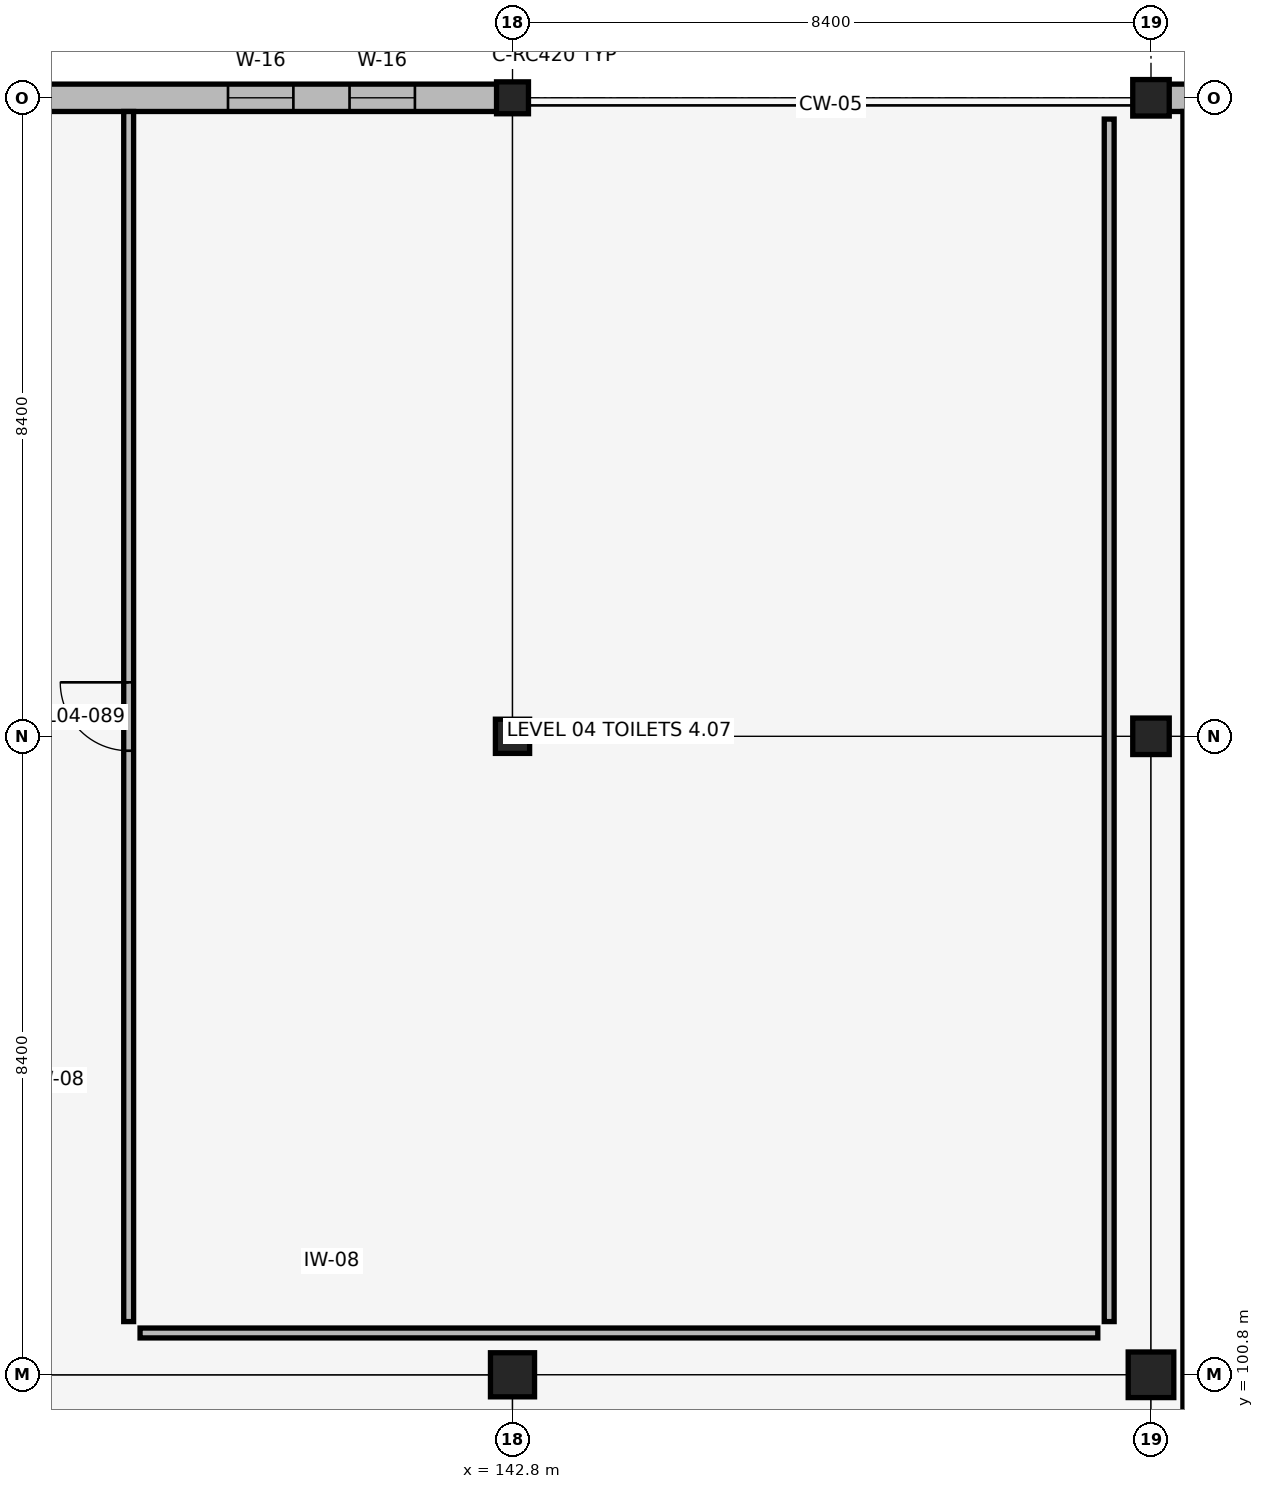
"""IFC4 building model, lengths in metres.
Left out: names, types, materials, properties, quantities, classifications, styles, units other than length and angle.
Written with IfcOpenShell. Run it as: python <this file> out.ifc"""

import sys

from ifc_helpers import new_model, si_unit, direction, frame, frame_2d, origin, origin_2d, place, context, subcontext, project, spatial, rectangle, extrude, element, fill, save


model = new_model("IFC4")
c1 = context("Model", 3, precision=1e-05, world=origin(), true_north=direction((0.0, 1.0)))
c2 = subcontext(c1, "Body", "Model", "MODEL_VIEW")
j1 = project(units=[si_unit("LENGTHUNIT", "METRE"), si_unit("PLANEANGLEUNIT", "RADIAN")], contexts=[c1])
p1 = place(None, origin())
s1 = spatial("IfcSite", under=j1, at=p1, CompositionType="ELEMENT")
p2 = place(p1, origin())
s2 = spatial("IfcBuilding", under=s1, at=p2, CompositionType="ELEMENT")
p3 = place(p2, frame((0.0, 0.0, 18.02)))
s3 = spatial("IfcBuildingStorey", under=s2, at=p3, CompositionType="ELEMENT", Elevation=18.02)
p4 = place(p3, frame((142.8, 100.8, 0.0), z_axis=(0.0, 0.0, 1.0), x_axis=(1.0, 0.0, 0.0)))
e1 = element("IfcColumn", 1, at=p4, inside=s3, PredefinedType="COLUMN", context=c2, shape_type="SweptSolid", body=[
    extrude(rectangle(XDim=0.58, YDim=0.58, at=origin_2d()), origin(), (0.0, 0.0, 1.0), 3.78),
])
p5 = place(p3, frame((142.8, 109.2, 0.0), z_axis=(0.0, 0.0, 1.0), x_axis=(1.0, 0.0, 0.0)))
e2 = element("IfcColumn", 2, at=p5, inside=s3, PredefinedType="COLUMN", context=c2, shape_type="SweptSolid", body=[
    extrude(rectangle(XDim=0.45, YDim=0.45, at=origin_2d()), origin(), (0.0, 0.0, 1.0), 3.78),
])
p6 = place(p3, frame((142.8, 117.6, 0.0), z_axis=(0.0, 0.0, 1.0), x_axis=(1.0, 0.0, 0.0)))
e3 = element("IfcColumn", 3, at=p6, inside=s3, PredefinedType="COLUMN", context=c2, shape_type="SweptSolid", body=[
    extrude(rectangle(XDim=0.42, YDim=0.42, at=origin_2d()), origin(), (0.0, 0.0, 1.0), 3.78),
])
p7 = place(p3, frame((151.2, 100.8, 0.0), z_axis=(0.0, 0.0, 1.0), x_axis=(1.0, 0.0, 0.0)))
e4 = element("IfcColumn", 4, at=p7, inside=s3, PredefinedType="COLUMN", context=c2, shape_type="SweptSolid", body=[
    extrude(rectangle(XDim=0.6, YDim=0.6, at=origin_2d()), origin(), (0.0, 0.0, 1.0), 3.78),
])
for number, where, z_axis, x_axis in (
    (5, (151.2, 109.2, 0.0), (0.0, 0.0, 1.0), (1.0, 0.0, 0.0)),
    (6, (151.2, 117.6, 0.0), (0.0, 0.0, 1.0), (1.0, 0.0, 0.0)),
):
    element("IfcColumn", number, at=place(p3, frame(where, z_axis=z_axis, x_axis=x_axis)), inside=s3, PredefinedType="COLUMN", context=c2, shape_type="SweptSolid", body=[
        extrude(rectangle(XDim=0.48, YDim=0.48, at=origin_2d()), origin(), (0.0, 0.0, 1.0), 3.78),
    ])
p8 = place(p3, frame((134.61, 117.6, 0.0), z_axis=(0.0, 0.0, 1.0), x_axis=(1.0, 0.0, 0.0)))
e7 = element("IfcWall", 7, at=p8, inside=s3, PredefinedType="SOLIDWALL", context=c2, shape_type="SweptSolid", body=[
    extrude(rectangle(XDim=7.995, YDim=0.36, at=frame_2d((3.998, 0.0))), origin(), (0.0, 0.0, 1.0), 3.78),
])
p9 = place(p8, frame((1.089, 0.0, 0.75)))
e8 = element("IfcOpeningElement", 8, at=p9, cuts=e7, PredefinedType="OPENING", context=c2, shape_type="SweptSolid", body=[
    extrude(rectangle(XDim=0.86, YDim=2.6, at=frame_2d((0.43, 1.3))), frame((0.0, 0.19, 0.0), z_axis=(0.0, -1.0, 0.0), x_axis=(1.0, 0.0, 0.0)), (0.0, 0.0, 1.0), 0.38),
])
p10 = place(p8, frame((4.447, 0.0, 0.75)))
e9 = element("IfcOpeningElement", 9, at=p10, cuts=e7, PredefinedType="OPENING", context=c2, shape_type="SweptSolid", body=[
    extrude(rectangle(XDim=0.86, YDim=2.6, at=frame_2d((0.43, 1.3))), frame((0.0, 0.19, 0.0), z_axis=(0.0, -1.0, 0.0), x_axis=(1.0, 0.0, 0.0)), (0.0, 0.0, 1.0), 0.38),
])
p11 = place(p8, frame((6.046, 0.0, 0.75)))
e10 = element("IfcOpeningElement", 10, at=p11, cuts=e7, PredefinedType="OPENING", context=c2, shape_type="SweptSolid", body=[
    extrude(rectangle(XDim=0.86, YDim=2.6, at=frame_2d((0.43, 1.3))), frame((0.0, 0.19, 0.0), z_axis=(0.0, -1.0, 0.0), x_axis=(1.0, 0.0, 0.0)), (0.0, 0.0, 1.0), 0.38),
])
p12 = place(p3, frame((151.425, 117.6, 0.0), z_axis=(0.0, 0.0, 1.0), x_axis=(1.0, 0.0, 0.0)))
e11 = element("IfcWall", 11, at=p12, inside=s3, PredefinedType="SOLIDWALL", context=c2, shape_type="SweptSolid", body=[
    extrude(rectangle(XDim=7.98, YDim=0.36, at=frame_2d((3.99, 0.0))), origin(), (0.0, 0.0, 1.0), 3.78),
])
p13 = place(p12, frame((1.056, 0.0, 0.75)))
e12 = element("IfcOpeningElement", 12, at=p13, cuts=e11, PredefinedType="OPENING", context=c2, shape_type="SweptSolid", body=[
    extrude(rectangle(XDim=0.92, YDim=2.5, at=frame_2d((0.46, 1.25))), frame((0.0, 0.19, 0.0), z_axis=(0.0, -1.0, 0.0), x_axis=(1.0, 0.0, 0.0)), (0.0, 0.0, 1.0), 0.38),
])
p14 = place(p12, frame((2.652, 0.0, 0.75)))
e13 = element("IfcOpeningElement", 13, at=p14, cuts=e11, PredefinedType="OPENING", context=c2, shape_type="SweptSolid", body=[
    extrude(rectangle(XDim=0.92, YDim=2.5, at=frame_2d((0.46, 1.25))), frame((0.0, 0.19, 0.0), z_axis=(0.0, -1.0, 0.0), x_axis=(1.0, 0.0, 0.0)), (0.0, 0.0, 1.0), 0.38),
])
p15 = place(p12, frame((4.408, 0.0, 0.75)))
e14 = element("IfcOpeningElement", 14, at=p15, cuts=e11, PredefinedType="OPENING", context=c2, shape_type="SweptSolid", body=[
    extrude(rectangle(XDim=0.92, YDim=2.5, at=frame_2d((0.46, 1.25))), frame((0.0, 0.19, 0.0), z_axis=(0.0, -1.0, 0.0), x_axis=(1.0, 0.0, 0.0)), (0.0, 0.0, 1.0), 0.38),
])
p16 = place(p12, frame((6.004, 0.0, 0.75)))
e15 = element("IfcOpeningElement", 15, at=p16, cuts=e11, PredefinedType="OPENING", context=c2, shape_type="SweptSolid", body=[
    extrude(rectangle(XDim=0.92, YDim=2.5, at=frame_2d((0.46, 1.25))), frame((0.0, 0.19, 0.0), z_axis=(0.0, -1.0, 0.0), x_axis=(1.0, 0.0, 0.0)), (0.0, 0.0, 1.0), 0.38),
])
p17 = place(p3, frame((151.7, 87.5, 0.0), z_axis=(0.0, 0.0, 1.0), x_axis=(0.0, 1.0, 0.0)))
e16 = element("IfcWall", 16, at=p17, inside=s3, PredefinedType="PARTITIONING", context=c2, shape_type="SweptSolid", body=[
    extrude(rectangle(XDim=29.92, YDim=0.16, at=frame_2d((14.96, 0.0))), origin(), (0.0, 0.0, 1.0), 3.16),
])
p18 = place(p3, frame((137.75, 101.5, 0.0), z_axis=(0.0, 0.0, 1.0), x_axis=(0.0, 1.0, 0.0)))
e17 = element("IfcWall", 17, at=p18, inside=s3, PredefinedType="PARTITIONING", context=c2, shape_type="SweptSolid", body=[
    extrude(rectangle(XDim=15.92, YDim=0.13, at=frame_2d((7.96, 0.0))), origin(), (0.0, 0.0, 1.0), 3.78),
])
p19 = place(p18, frame((7.51, 0.0, 0.0)))
e18 = element("IfcOpeningElement", 18, at=p19, cuts=e17, PredefinedType="OPENING", context=c2, shape_type="SweptSolid", body=[
    extrude(rectangle(XDim=0.9, YDim=2.1, at=frame_2d((0.45, 1.05))), frame((0.0, 0.075, 0.0), z_axis=(0.0, -1.0, 0.0), x_axis=(1.0, 0.0, 0.0)), (0.0, 0.0, 1.0), 0.15),
])
p20 = place(p3, frame((137.9, 101.35, 0.0), z_axis=(0.0, 0.0, 1.0), x_axis=(1.0, 0.0, 0.0)))
e19 = element("IfcWall", 19, at=p20, inside=s3, PredefinedType="PARTITIONING", context=c2, shape_type="SweptSolid", body=[
    extrude(rectangle(XDim=12.6, YDim=0.13, at=frame_2d((6.3, 0.0))), origin(), (0.0, 0.0, 1.0), 3.78),
])
p21 = place(p3, frame((150.65, 101.5, 0.0), z_axis=(0.0, 0.0, 1.0), x_axis=(0.0, 1.0, 0.0)))
e20 = element("IfcWall", 20, at=p21, inside=s3, PredefinedType="PARTITIONING", context=c2, shape_type="SweptSolid", body=[
    extrude(rectangle(XDim=15.82, YDim=0.13, at=frame_2d((7.91, 0.0))), origin(), (0.0, 0.0, 1.0), 3.78),
])
p22 = place(p10, origin())
e21 = element("IfcWindow", 21, at=p22, inside=s3, PartitioningType="DOUBLE_PANEL_VERTICAL", PredefinedType="WINDOW", context=c2, shape_type="SweptSolid", body=[
    extrude(rectangle(XDim=0.86, YDim=2.6, at=frame_2d((0.43, 1.3))), frame((0.0, 0.03, 0.0), z_axis=(0.0, -1.0, 0.0), x_axis=(1.0, 0.0, 0.0)), (0.0, 0.0, 1.0), 0.06),
])
fill(e9, e21)
p23 = place(p11, origin())
e22 = element("IfcWindow", 22, at=p23, inside=s3, PartitioningType="DOUBLE_PANEL_VERTICAL", PredefinedType="WINDOW", context=c2, shape_type="SweptSolid", body=[
    extrude(rectangle(XDim=0.86, YDim=2.6, at=frame_2d((0.43, 1.3))), frame((0.0, 0.03, 0.0), z_axis=(0.0, -1.0, 0.0), x_axis=(1.0, 0.0, 0.0)), (0.0, 0.0, 1.0), 0.06),
])
fill(e10, e22)
p24 = place(p19, origin())
e23 = element("IfcDoor", 23, at=p24, inside=s3, OperationType="SINGLE_SWING_RIGHT", PredefinedType="DOOR", context=c2, shape_type="SweptSolid", body=[
    extrude(rectangle(XDim=0.9, YDim=2.1, at=frame_2d((0.45, 1.05))), frame((0.0, 0.025, 0.0), z_axis=(0.0, -1.0, 0.0), x_axis=(1.0, 0.0, 0.0)), (0.0, 0.0, 1.0), 0.05),
])
fill(e18, e23)
save(model, sys.argv[1])
